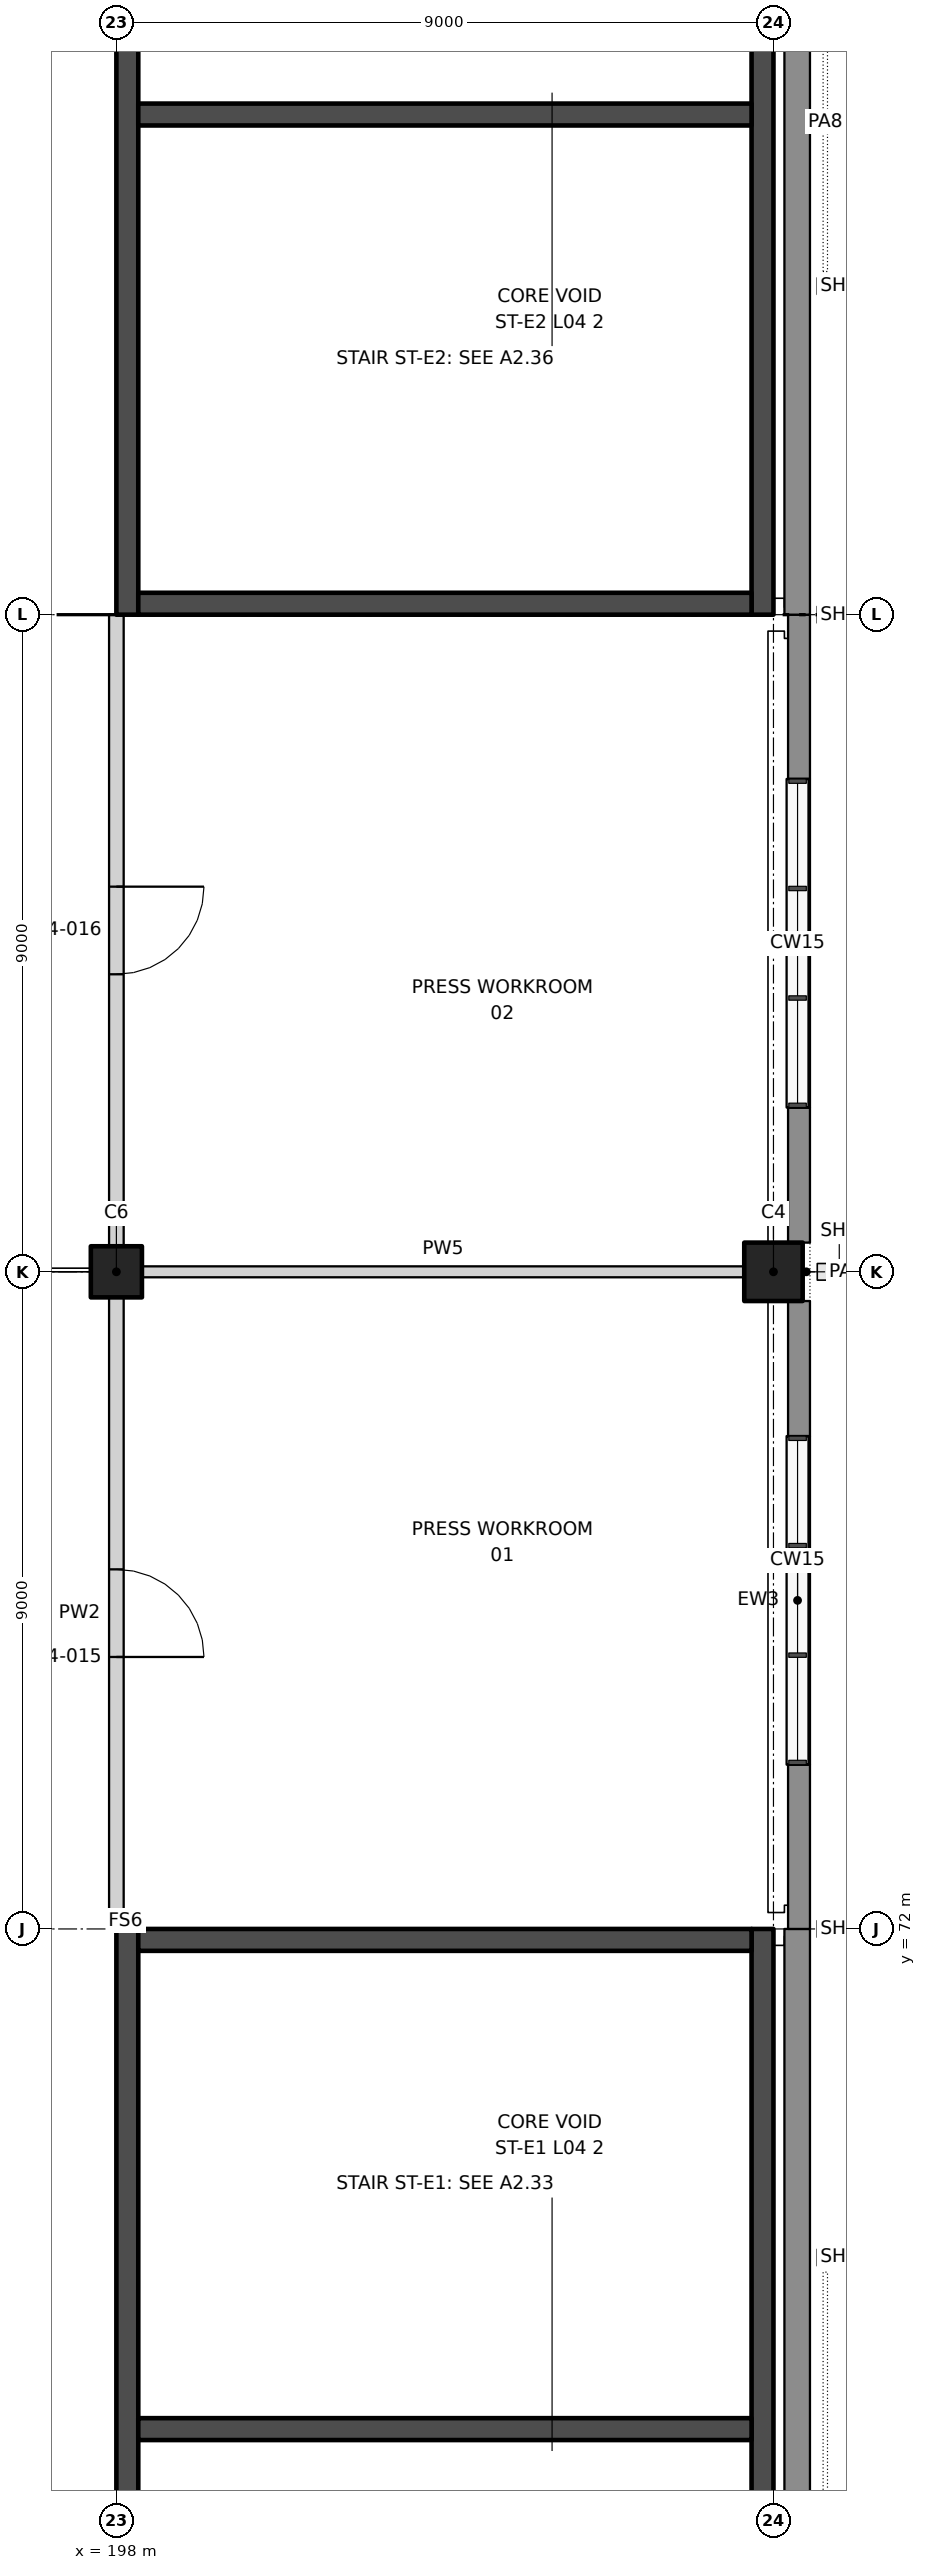
"""IFC4 building model, lengths in metres.
Left out: names, types, materials, properties, quantities, classifications, styles, units other than length and angle.
Written with IfcOpenShell. Run it as: python <this file> out.ifc"""

import sys

from ifc_helpers import new_model, si_unit, direction, frame, frame_2d, origin, origin_2d, place, context, subcontext, project, spatial, rectangle, extrude, element, fill, save


model = new_model("IFC4")
c1 = context("Model", 3, precision=1e-05, world=origin(), true_north=direction((0.0, 1.0)))
c2 = subcontext(c1, "Body", "Model", "MODEL_VIEW")
j1 = project(units=[si_unit("LENGTHUNIT", "METRE"), si_unit("PLANEANGLEUNIT", "RADIAN")], contexts=[c1])
p1 = place(None, origin())
s1 = spatial("IfcSite", under=j1, at=p1, CompositionType="ELEMENT")
p2 = place(p1, origin())
s2 = spatial("IfcBuilding", under=s1, at=p2, CompositionType="ELEMENT")
p3 = place(p2, frame((0.0, 0.0, 28.0)))
s3 = spatial("IfcBuildingStorey", under=s2, at=p3, CompositionType="ELEMENT", Elevation=28.0)
p4 = place(p3, frame((207.0, 81.0, 0.0), z_axis=(0.0, 0.0, 1.0), x_axis=(1.0, 0.0, 0.0)))
e1 = element("IfcColumn", 1, at=p4, inside=s3, PredefinedType="COLUMN", context=c2, shape_type="SweptSolid", body=[
    extrude(rectangle(XDim=0.8, YDim=0.8, at=origin_2d()), origin(), (0.0, 0.0, 1.0), 5.5),
])
p5 = place(p3, frame((198.0, 81.0, 0.0), z_axis=(0.0, 0.0, 1.0), x_axis=(1.0, 0.0, 0.0)))
e2 = element("IfcColumn", 2, at=p5, inside=s3, PredefinedType="COLUMN", context=c2, shape_type="SweptSolid", body=[
    extrude(rectangle(XDim=0.7, YDim=0.7, at=origin_2d()), origin(), (0.0, 0.0, 1.0), 5.5),
])
p6 = place(p3, frame((198.35, 81.0, 0.0), z_axis=(0.0, 0.0, 1.0), x_axis=(1.0, 0.0, 0.0)))
e3 = element("IfcWall", 3, at=p6, inside=s3, PredefinedType="PARTITIONING", context=c2, shape_type="SweptSolid", body=[
    extrude(rectangle(XDim=8.25, YDim=0.15, at=frame_2d((4.125, 0.0))), origin(), (0.0, 0.0, 1.0), 9.5),
])
p7 = place(p3, frame((198.0, 72.0, 0.0), z_axis=(0.0, 0.0, 1.0), x_axis=(0.0, 1.0, 0.0)))
e4 = element("IfcWall", 4, at=p7, inside=s3, PredefinedType="PARTITIONING", context=c2, shape_type="SweptSolid", body=[
    extrude(rectangle(XDim=8.65, YDim=0.2, at=frame_2d((4.325, 0.0))), origin(), (0.0, 0.0, 1.0), 3.8),
])
p8 = place(p7, frame((3.725, 0.0, 0.0)))
e5 = element("IfcOpeningElement", 5, at=p8, cuts=e4, PredefinedType="OPENING", context=c2, shape_type="SweptSolid", body=[
    extrude(rectangle(XDim=1.2, YDim=2.1, at=frame_2d((0.6, 1.05))), frame((0.0, 0.11, 0.0), z_axis=(0.0, -1.0, 0.0), x_axis=(1.0, 0.0, 0.0)), (0.0, 0.0, 1.0), 0.22),
])
p9 = place(p3, frame((198.0, 81.35, 0.0), z_axis=(0.0, 0.0, 1.0), x_axis=(0.0, 1.0, 0.0)))
e6 = element("IfcWall", 6, at=p9, inside=s3, PredefinedType="PARTITIONING", context=c2, shape_type="SweptSolid", body=[
    extrude(rectangle(XDim=8.65, YDim=0.2, at=frame_2d((4.325, 0.0))), origin(), (0.0, 0.0, 1.0), 4.2),
])
p10 = place(p9, frame((3.725, 0.0, 0.0)))
e7 = element("IfcOpeningElement", 7, at=p10, cuts=e6, PredefinedType="OPENING", context=c2, shape_type="SweptSolid", body=[
    extrude(rectangle(XDim=1.2, YDim=2.1, at=frame_2d((0.6, 1.05))), frame((0.0, 0.11, 0.0), z_axis=(0.0, -1.0, 0.0), x_axis=(1.0, 0.0, 0.0)), (0.0, 0.0, 1.0), 0.22),
])
p11 = place(p3, frame((207.325, 63.0, 0.0), z_axis=(0.0, 0.0, 1.0), x_axis=(0.0, 1.0, 0.0)))
e8 = element("IfcWall", 8, at=p11, inside=s3, PredefinedType="SOLIDWALL", context=c2, shape_type="SweptSolid", body=[
    extrude(rectangle(XDim=9.0, YDim=0.35, at=frame_2d((4.5, 0.0))), origin(), (0.0, 0.0, 1.0), 5.5),
])
p12 = place(p3, frame((207.35, 72.0, 0.0), z_axis=(0.0, 0.0, 1.0), x_axis=(0.0, 1.0, 0.0)))
e9 = element("IfcWall", 9, at=p12, inside=s3, PredefinedType="SOLIDWALL", context=c2, shape_type="SweptSolid", body=[
    extrude(rectangle(XDim=2.25, YDim=0.3, at=frame_2d((1.125, 0.0))), origin(), (0.0, 0.0, 1.0), 4.9),
])
p13 = place(p3, frame((207.35, 78.75, 0.0), z_axis=(0.0, 0.0, 1.0), x_axis=(0.0, 1.0, 0.0)))
e10 = element("IfcWall", 10, at=p13, inside=s3, PredefinedType="SOLIDWALL", context=c2, shape_type="SweptSolid", body=[
    extrude(rectangle(XDim=1.85, YDim=0.3, at=frame_2d((0.925, 0.0))), origin(), (0.0, 0.0, 1.0), 4.9),
])
p14 = place(p3, frame((207.35, 74.25, 0.0), z_axis=(0.0, 0.0, 1.0), x_axis=(0.0, 1.0, 0.0)))
e11 = element("IfcWall", 11, at=p14, inside=s3, PredefinedType="SOLIDWALL", context=c2, shape_type="SweptSolid", body=[
    extrude(rectangle(XDim=4.5, YDim=0.3, at=frame_2d((2.25, 0.0))), origin(), (0.0, 0.0, 1.0), 1.0),
])
p15 = place(p3, frame((207.35, 81.4, 0.0), z_axis=(0.0, 0.0, 1.0), x_axis=(0.0, 1.0, 0.0)))
e12 = element("IfcWall", 12, at=p15, inside=s3, PredefinedType="SOLIDWALL", context=c2, shape_type="SweptSolid", body=[
    extrude(rectangle(XDim=1.85, YDim=0.3, at=frame_2d((0.925, 0.0))), origin(), (0.0, 0.0, 1.0), 4.9),
])
p16 = place(p3, frame((207.35, 87.75, 0.0), z_axis=(0.0, 0.0, 1.0), x_axis=(0.0, 1.0, 0.0)))
e13 = element("IfcWall", 13, at=p16, inside=s3, PredefinedType="SOLIDWALL", context=c2, shape_type="SweptSolid", body=[
    extrude(rectangle(XDim=2.25, YDim=0.3, at=frame_2d((1.125, 0.0))), origin(), (0.0, 0.0, 1.0), 4.9),
])
p17 = place(p3, frame((207.35, 83.25, 0.0), z_axis=(0.0, 0.0, 1.0), x_axis=(0.0, 1.0, 0.0)))
e14 = element("IfcWall", 14, at=p17, inside=s3, PredefinedType="SOLIDWALL", context=c2, shape_type="SweptSolid", body=[
    extrude(rectangle(XDim=4.5, YDim=0.3, at=frame_2d((2.25, 0.0))), origin(), (0.0, 0.0, 1.0), 1.0),
])
p18 = place(p3, frame((207.325, 90.0, 0.0), z_axis=(0.0, 0.0, 1.0), x_axis=(0.0, 1.0, 0.0)))
e15 = element("IfcWall", 15, at=p18, inside=s3, PredefinedType="SOLIDWALL", context=c2, shape_type="SweptSolid", body=[
    extrude(rectangle(XDim=9.0, YDim=0.35, at=frame_2d((4.5, 0.0))), origin(), (0.0, 0.0, 1.0), 5.5),
])
p19 = place(p3, frame((198.15, 54.0, 0.0), z_axis=(0.0, 0.0, 1.0), x_axis=(0.0, 1.0, 0.0)))
e16 = element("IfcWall", 16, at=p19, inside=s3, PredefinedType="SHEAR", context=c2, shape_type="SweptSolid", body=[
    extrude(rectangle(XDim=18.0, YDim=0.3, at=frame_2d((9.0, 0.0))), origin(), (0.0, 0.0, 1.0), 5.5),
])
p20 = place(p19, frame((1.5, 0.0, 0.0)))
e17 = element("IfcOpeningElement", 17, at=p20, cuts=e16, PredefinedType="OPENING", context=c2, shape_type="SweptSolid", body=[
    extrude(rectangle(XDim=1.2, YDim=2.1, at=frame_2d((0.6, 1.05))), frame((0.0, 0.16, 0.0), z_axis=(0.0, -1.0, 0.0), x_axis=(1.0, 0.0, 0.0)), (0.0, 0.0, 1.0), 0.32),
])
p21 = place(p3, frame((206.85, 54.0, 0.0), z_axis=(0.0, 0.0, 1.0), x_axis=(0.0, 1.0, 0.0)))
e18 = element("IfcWall", 18, at=p21, inside=s3, PredefinedType="SHEAR", context=c2, shape_type="SweptSolid", body=[
    extrude(rectangle(XDim=18.0, YDim=0.3, at=frame_2d((9.0, 0.0))), origin(), (0.0, 0.0, 1.0), 5.5),
])
for number, where, z_axis, x_axis in (
    (19, (198.3, 71.85, 0.0), (0.0, 0.0, 1.0), (1.0, 0.0, 0.0)),
    (20, (198.3, 65.15, 0.0), (0.0, 0.0, 1.0), (1.0, 0.0, 0.0)),
):
    element("IfcWall", number, at=place(p3, frame(where, z_axis=z_axis, x_axis=x_axis)), inside=s3, PredefinedType="SHEAR", context=c2, shape_type="SweptSolid", body=[
        extrude(rectangle(XDim=8.4, YDim=0.3, at=frame_2d((4.2, 0.0))), origin(), (0.0, 0.0, 1.0), 5.5),
    ])
p22 = place(p3, frame((198.15, 108.0, 0.0), z_axis=(0.0, 0.0, 1.0), x_axis=(0.0, -1.0, 0.0)))
e21 = element("IfcWall", 21, at=p22, inside=s3, PredefinedType="SHEAR", context=c2, shape_type="SweptSolid", body=[
    extrude(rectangle(XDim=18.0, YDim=0.3, at=frame_2d((9.0, 0.0))), origin(), (0.0, 0.0, 1.0), 5.5),
])
p23 = place(p22, frame((1.5, 0.0, 0.0)))
e22 = element("IfcOpeningElement", 22, at=p23, cuts=e21, PredefinedType="OPENING", context=c2, shape_type="SweptSolid", body=[
    extrude(rectangle(XDim=1.2, YDim=2.1, at=frame_2d((0.6, 1.05))), frame((0.0, 0.16, 0.0), z_axis=(0.0, -1.0, 0.0), x_axis=(1.0, 0.0, 0.0)), (0.0, 0.0, 1.0), 0.32),
])
p24 = place(p3, frame((206.85, 108.0, 0.0), z_axis=(0.0, 0.0, 1.0), x_axis=(0.0, -1.0, 0.0)))
e23 = element("IfcWall", 23, at=p24, inside=s3, PredefinedType="SHEAR", context=c2, shape_type="SweptSolid", body=[
    extrude(rectangle(XDim=18.0, YDim=0.3, at=frame_2d((9.0, 0.0))), origin(), (0.0, 0.0, 1.0), 5.5),
])
for number, where, z_axis, x_axis in (
    (24, (198.3, 90.15, 0.0), (0.0, 0.0, 1.0), (1.0, 0.0, 0.0)),
    (25, (198.3, 96.85, 0.0), (0.0, 0.0, 1.0), (1.0, 0.0, 0.0)),
):
    element("IfcWall", number, at=place(p3, frame(where, z_axis=z_axis, x_axis=x_axis)), inside=s3, PredefinedType="SHEAR", context=c2, shape_type="SweptSolid", body=[
        extrude(rectangle(XDim=8.4, YDim=0.3, at=frame_2d((4.2, 0.0))), origin(), (0.0, 0.0, 1.0), 5.5),
    ])
p25 = place(p8, frame((1.2, 0.0, 0.0), z_axis=(0.0, 0.0, 1.0), x_axis=(-1.0, 0.0, 0.0)))
e26 = element("IfcDoor", 26, at=p25, inside=s3, OperationType="SINGLE_SWING_RIGHT", PredefinedType="DOOR", context=c2, shape_type="SweptSolid", body=[
    extrude(rectangle(XDim=1.2, YDim=2.1, at=frame_2d((0.6, 1.05))), frame((0.0, 0.025, 0.0), z_axis=(0.0, -1.0, 0.0), x_axis=(1.0, 0.0, 0.0)), (0.0, 0.0, 1.0), 0.05),
])
fill(e5, e26)
p26 = place(p10, frame((1.2, 0.0, 0.0), z_axis=(0.0, 0.0, 1.0), x_axis=(-1.0, 0.0, 0.0)))
e27 = element("IfcDoor", 27, at=p26, inside=s3, OperationType="SINGLE_SWING_LEFT", PredefinedType="DOOR", context=c2, shape_type="SweptSolid", body=[
    extrude(rectangle(XDim=1.2, YDim=2.1, at=frame_2d((0.6, 1.05))), frame((0.0, 0.025, 0.0), z_axis=(0.0, -1.0, 0.0), x_axis=(1.0, 0.0, 0.0)), (0.0, 0.0, 1.0), 0.05),
])
fill(e7, e27)
save(model, sys.argv[1])
